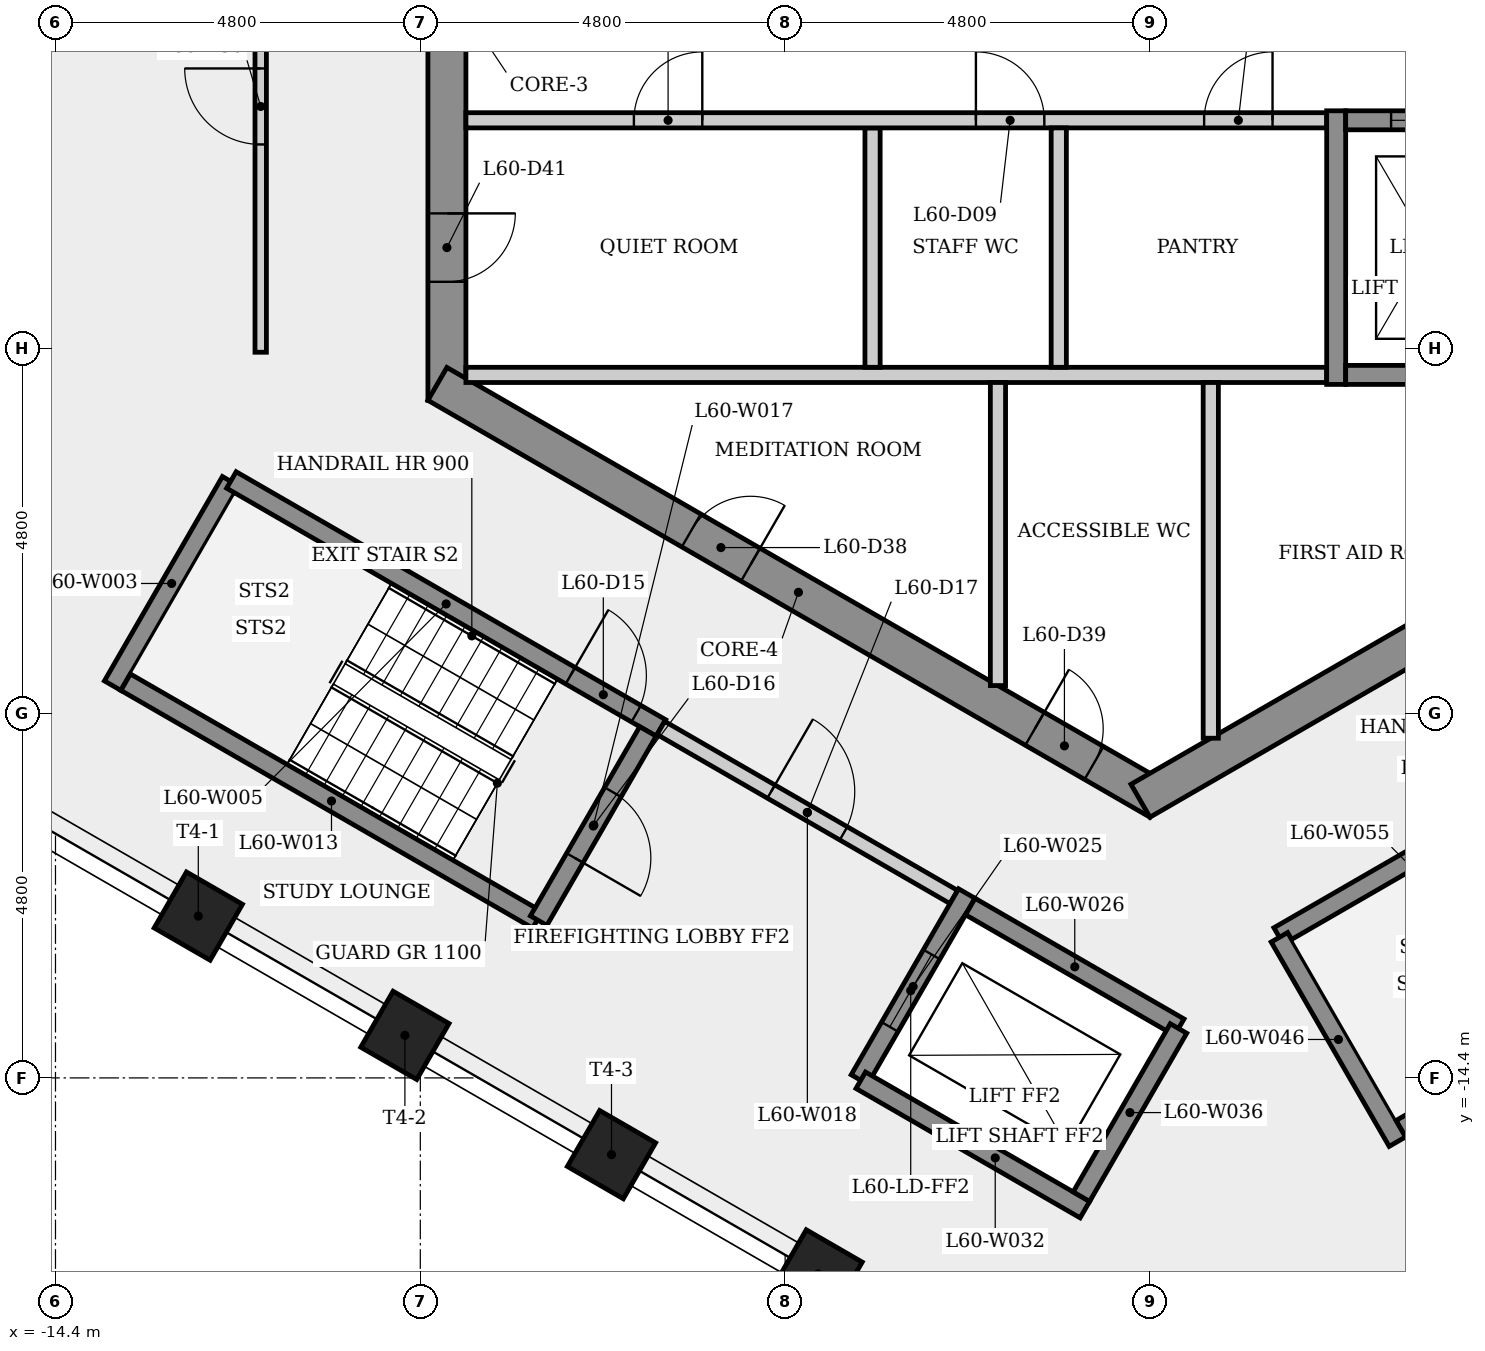
"""IFC4 building model, lengths in metres.
Left out: names, types, materials, properties, quantities, classifications, styles, units other than length and angle.
Written with IfcOpenShell. Run it as: python <this file> out.ifc"""

import sys

from ifc_helpers import new_model, si_unit, direction, frame, frame_2d, origin, origin_2d, place, context, subcontext, project, spatial, rectangle, extrude, element, fill, save


model = new_model("IFC4")
c1 = context("Model", 3, precision=1e-05, world=origin(), true_north=direction((0.0, 1.0)))
c2 = subcontext(c1, "Body", "Model", "MODEL_VIEW")
j1 = project(units=[si_unit("LENGTHUNIT", "METRE"), si_unit("PLANEANGLEUNIT", "RADIAN")], contexts=[c1])
p1 = place(None, origin())
s1 = spatial("IfcSite", under=j1, at=p1, CompositionType="ELEMENT")
p2 = place(p1, origin())
s2 = spatial("IfcBuilding", under=s1, at=p2, CompositionType="ELEMENT")
p3 = place(p2, frame((0.0, 0.0, 225.7)))
s3 = spatial("IfcBuildingStorey", under=s2, at=p3, CompositionType="ELEMENT", Elevation=225.7)
p4 = place(p3, frame((-9.25, 5.485, 0.0), z_axis=(0.0, 0.0, 1.0), x_axis=(0.0, -1.0, 0.0)))
e1 = element("IfcWall", 1, at=p4, inside=s3, PredefinedType="SHEAR", context=c2, shape_type="SweptSolid", body=[
    extrude(rectangle(XDim=10.97, YDim=0.5, at=frame_2d((5.485, 0.0))), origin(), (0.0, 0.0, 1.0), 3.4),
])
p5 = place(p4, frame((8.51, 0.0, 0.0)))
e2 = element("IfcOpeningElement", 2, at=p5, cuts=e1, PredefinedType="OPENING", context=c2, shape_type="SweptSolid", body=[
    extrude(rectangle(XDim=0.9, YDim=2.1, at=frame_2d((0.45, 1.05))), frame((0.0, 0.26, 0.0), z_axis=(0.0, -1.0, 0.0), x_axis=(1.0, 0.0, 0.0)), (0.0, 0.0, 1.0), 0.52),
])
p6 = place(p4, frame((4.685, 0.0, 0.0)))
e3 = element("IfcOpeningElement", 3, at=p6, cuts=e1, PredefinedType="OPENING", context=c2, shape_type="SweptSolid", body=[
    extrude(rectangle(XDim=1.6, YDim=2.1, at=frame_2d((0.8, 1.05))), frame((0.0, 0.26, 0.0), z_axis=(0.0, -1.0, 0.0), x_axis=(1.0, 0.0, 0.0)), (0.0, 0.0, 1.0), 0.52),
])
p7 = place(p3, frame((-9.375, -5.268, 0.0), z_axis=(0.0, 0.0, 1.0), x_axis=(0.866023993627, -0.500002442456, 0.0)))
e4 = element("IfcWall", 4, at=p7, inside=s3, PredefinedType="SHEAR", context=c2, shape_type="SweptSolid", body=[
    extrude(rectangle(XDim=10.97, YDim=0.5, at=frame_2d((5.485, 0.0))), origin(), (0.0, 0.0, 1.0), 3.4),
])
p8 = place(p7, frame((3.857, 0.0, 0.0)))
e5 = element("IfcOpeningElement", 5, at=p8, cuts=e4, PredefinedType="OPENING", context=c2, shape_type="SweptSolid", body=[
    extrude(rectangle(XDim=0.9, YDim=2.1, at=frame_2d((0.45, 1.05))), frame((0.0, 0.26, 0.0), z_axis=(0.0, -1.0, 0.0), x_axis=(1.0, 0.0, 0.0)), (0.0, 0.0, 1.0), 0.52),
])
p9 = place(p7, frame((9.076, 0.0, 0.0)))
e6 = element("IfcOpeningElement", 6, at=p9, cuts=e4, PredefinedType="OPENING", context=c2, shape_type="SweptSolid", body=[
    extrude(rectangle(XDim=0.9, YDim=2.1, at=frame_2d((0.45, 1.05))), frame((0.0, 0.26, 0.0), z_axis=(0.0, -1.0, 0.0), x_axis=(1.0, 0.0, 0.0)), (0.0, 0.0, 1.0), 0.52),
])
p10 = place(p3, frame((-0.125, -10.753, 0.0), z_axis=(0.0, 0.0, 1.0), x_axis=(0.866023993627, 0.500002442456, 0.0)))
e7 = element("IfcWall", 7, at=p10, inside=s3, PredefinedType="SHEAR", context=c2, shape_type="SweptSolid", body=[
    extrude(rectangle(XDim=10.97, YDim=0.5, at=frame_2d((5.485, 0.0))), origin(), (0.0, 0.0, 1.0), 3.4),
])
p11 = place(p10, frame((7.195, 0.0, 0.0)))
e8 = element("IfcOpeningElement", 8, at=p11, cuts=e7, PredefinedType="OPENING", context=c2, shape_type="SweptSolid", body=[
    extrude(rectangle(XDim=0.9, YDim=2.1, at=frame_2d((0.45, 1.05))), frame((0.0, 0.26, 0.0), z_axis=(0.0, -1.0, 0.0), x_axis=(1.0, 0.0, 0.0)), (0.0, 0.0, 1.0), 0.52),
])
for number, where, z_axis, x_axis in (
    (9, (-12.521, -12.271, 0.0), (0.0, 0.0, 1.0), (-0.5, -0.866, 0.0)),
    (10, (-9.803, -13.84, 0.0), (0.0, 0.0, 1.0), (-0.5, -0.866, 0.0)),
    (11, (-7.085, -15.41, 0.0), (0.0, 0.0, 1.0), (-0.5, -0.866, 0.0)),
    (12, (-4.366, -16.979, 0.0), (0.0, 0.0, 1.0), (-0.5, -0.866, 0.0)),
):
    element("IfcColumn", number, at=place(p3, frame(where, z_axis=z_axis, x_axis=x_axis)), inside=s3, PredefinedType="COLUMN", context=c2, shape_type="SweptSolid", body=[
        extrude(rectangle(XDim=0.85, YDim=0.85, at=origin_2d()), origin(), (0.0, 0.0, 1.0), 3.4),
    ])
p12 = place(p3, frame((-13.648, -9.239, 0.0), z_axis=(0.0, 0.0, 1.0), x_axis=(0.500003782172, 0.866023220135, 0.0)))
e13 = element("IfcWall", 13, at=p12, inside=s3, PredefinedType="SHEAR", context=c2, shape_type="SweptSolid", body=[
    extrude(rectangle(XDim=3.105, YDim=0.25, at=frame_2d((1.552, 0.0))), origin(), (0.0, 0.0, 1.0), 3.05),
])
p13 = place(p3, frame((-12.085, -6.532, 0.0), z_axis=(0.0, 0.0, 1.0), x_axis=(0.866031063448, -0.499990197047, 0.0)))
e14 = element("IfcWall", 14, at=p13, inside=s3, PredefinedType="SHEAR", context=c2, shape_type="SweptSolid", body=[
    extrude(rectangle(XDim=6.525, YDim=0.25, at=frame_2d((3.263, 0.0))), origin(), (0.0, 0.0, 1.0), 3.05),
])
p14 = place(p13, frame((5.15, 0.0, 0.0)))
e15 = element("IfcOpeningElement", 15, at=p14, cuts=e14, PredefinedType="OPENING", context=c2, shape_type="SweptSolid", body=[
    extrude(rectangle(XDim=1.0, YDim=2.1, at=frame_2d((0.5, 1.05))), frame((0.0, 0.135, 0.0), z_axis=(0.0, -1.0, 0.0), x_axis=(1.0, 0.0, 0.0)), (0.0, 0.0, 1.0), 0.27),
])
p15 = place(p3, frame((-11.7, -4.852, 0.0), z_axis=(0.0, 0.0, 1.0), x_axis=(0.0, 1.0, 0.0)))
e16 = element("IfcWall", 16, at=p15, inside=s3, PredefinedType="PARTITIONING", context=c2, shape_type="SweptSolid", body=[
    extrude(rectangle(XDim=9.779, YDim=0.15, at=frame_2d((4.889, 0.0))), origin(), (0.0, 0.0, 1.0), 3.05),
])
p16 = place(p15, frame((7.586, 0.0, 0.0)))
e17 = element("IfcOpeningElement", 17, at=p16, cuts=e16, PredefinedType="OPENING", context=c2, shape_type="SweptSolid", body=[
    extrude(rectangle(XDim=1.0, YDim=2.1, at=frame_2d((0.5, 1.05))), frame((0.0, 0.085, 0.0), z_axis=(0.0, -1.0, 0.0), x_axis=(1.0, 0.0, 0.0)), (0.0, 0.0, 1.0), 0.17),
])
p17 = place(p15, frame((2.734, 0.0, 0.0)))
e18 = element("IfcOpeningElement", 18, at=p17, cuts=e16, PredefinedType="OPENING", context=c2, shape_type="SweptSolid", body=[
    extrude(rectangle(XDim=1.0, YDim=2.1, at=frame_2d((0.5, 1.05))), frame((0.0, 0.085, 0.0), z_axis=(0.0, -1.0, 0.0), x_axis=(1.0, 0.0, 0.0)), (0.0, 0.0, 1.0), 0.17),
])
p18 = place(p3, frame((-9.0, -5.15, 0.0), z_axis=(0.0, 0.0, 1.0), x_axis=(1.0, 0.0, 0.0)))
e19 = element("IfcWall", 19, at=p18, inside=s3, PredefinedType="PARTITIONING", context=c2, shape_type="SweptSolid", body=[
    extrude(rectangle(XDim=11.325, YDim=0.2, at=frame_2d((5.663, 0.0))), origin(), (0.0, 0.0, 1.0), 3.05),
])
p19 = place(p3, frame((-8.06, -12.321, 0.0), z_axis=(0.0, 0.0, 1.0), x_axis=(-0.866029591389, 0.499992746786, 0.0)))
e20 = element("IfcWall", 20, at=p19, inside=s3, PredefinedType="SHEAR", context=c2, shape_type="SweptSolid", body=[
    extrude(rectangle(XDim=6.255, YDim=0.25, at=frame_2d((3.127, 0.0))), origin(), (0.0, 0.0, 1.0), 3.05),
])
p20 = place(p3, frame((-6.605, -9.841, 0.0), z_axis=(0.0, 0.0, 1.0), x_axis=(-0.500011588718, -0.866018712932, 0.0)))
e21 = element("IfcWall", 21, at=p20, inside=s3, PredefinedType="SHEAR", context=c2, shape_type="SweptSolid", body=[
    extrude(rectangle(XDim=2.875, YDim=0.25, at=frame_2d((1.438, 0.0))), origin(), (0.0, 0.0, 1.0), 3.05),
])
p21 = place(p20, frame((0.923, 0.0, 0.0)))
e22 = element("IfcOpeningElement", 22, at=p21, cuts=e21, PredefinedType="OPENING", context=c2, shape_type="SweptSolid", body=[
    extrude(rectangle(XDim=1.0, YDim=2.1, at=frame_2d((0.5, 1.05))), frame((0.0, 0.135, 0.0), z_axis=(0.0, -1.0, 0.0), x_axis=(1.0, 0.0, 0.0)), (0.0, 0.0, 1.0), 0.27),
])
p22 = place(p3, frame((-6.435, -9.795, 0.0), z_axis=(0.0, 0.0, 1.0), x_axis=(0.866012907634, -0.500021643343, 0.0)))
e23 = element("IfcWall", 23, at=p22, inside=s3, PredefinedType="PARTITIONING", context=c2, shape_type="SweptSolid", body=[
    extrude(rectangle(XDim=4.45, YDim=0.2, at=frame_2d((2.225, 0.0))), origin(), (0.0, 0.0, 1.0), 3.05),
])
p23 = place(p22, frame((1.675, 0.0, 0.0)))
e24 = element("IfcOpeningElement", 24, at=p23, cuts=e23, PredefinedType="OPENING", context=c2, shape_type="SweptSolid", body=[
    extrude(rectangle(XDim=1.1, YDim=2.1, at=frame_2d((0.55, 1.05))), frame((0.0, 0.11, 0.0), z_axis=(0.0, -1.0, 0.0), x_axis=(1.0, 0.0, 0.0)), (0.0, 0.0, 1.0), 0.22),
])
p24 = place(p3, frame((-3.65, -1.9, 0.0), z_axis=(0.0, 0.0, 1.0), x_axis=(0.0, -1.0, 0.0)))
e25 = element("IfcWall", 25, at=p24, inside=s3, PredefinedType="PARTITIONING", context=c2, shape_type="SweptSolid", body=[
    extrude(rectangle(XDim=3.15, YDim=0.2, at=frame_2d((1.575, 0.0))), origin(), (0.0, 0.0, 1.0), 3.05),
])
p25 = place(p3, frame((-9.0, -1.8, 0.0), z_axis=(0.0, 0.0, 1.0), x_axis=(1.0, 0.0, 0.0)))
e26 = element("IfcWall", 26, at=p25, inside=s3, PredefinedType="PARTITIONING", context=c2, shape_type="SweptSolid", body=[
    extrude(rectangle(XDim=11.325, YDim=0.2, at=frame_2d((5.663, 0.0))), origin(), (0.0, 0.0, 1.0), 3.05),
])
p26 = place(p25, frame((2.21, 0.0, 0.0)))
e27 = element("IfcOpeningElement", 27, at=p26, cuts=e26, PredefinedType="OPENING", context=c2, shape_type="SweptSolid", body=[
    extrude(rectangle(XDim=0.9, YDim=2.1, at=frame_2d((0.45, 1.05))), frame((0.0, 0.11, 0.0), z_axis=(0.0, -1.0, 0.0), x_axis=(1.0, 0.0, 0.0)), (0.0, 0.0, 1.0), 0.22),
])
p27 = place(p25, frame((6.71, 0.0, 0.0)))
e28 = element("IfcOpeningElement", 28, at=p27, cuts=e26, PredefinedType="OPENING", context=c2, shape_type="SweptSolid", body=[
    extrude(rectangle(XDim=0.9, YDim=2.1, at=frame_2d((0.45, 1.05))), frame((0.0, 0.11, 0.0), z_axis=(0.0, -1.0, 0.0), x_axis=(1.0, 0.0, 0.0)), (0.0, 0.0, 1.0), 0.22),
])
p28 = place(p25, frame((9.713, 0.0, 0.0)))
e29 = element("IfcOpeningElement", 29, at=p28, cuts=e26, PredefinedType="OPENING", context=c2, shape_type="SweptSolid", body=[
    extrude(rectangle(XDim=0.9, YDim=2.1, at=frame_2d((0.45, 1.05))), frame((0.0, 0.11, 0.0), z_axis=(0.0, -1.0, 0.0), x_axis=(1.0, 0.0, 0.0)), (0.0, 0.0, 1.0), 0.22),
])
p29 = place(p3, frame((-2.41, -11.974, 0.0), z_axis=(0.0, 0.0, 1.0), x_axis=(-0.49998675294, -0.866033051843, 0.0)))
e30 = element("IfcWall", 30, at=p29, inside=s3, PredefinedType="SHEAR", context=c2, shape_type="SweptSolid", body=[
    extrude(rectangle(XDim=2.825, YDim=0.25, at=frame_2d((1.413, 0.0))), origin(), (0.0, 0.0, 1.0), 3.05),
])
p30 = place(p29, frame((0.926, 0.0, 0.0)))
e31 = element("IfcOpeningElement", 31, at=p30, cuts=e30, PredefinedType="OPENING", context=c2, shape_type="SweptSolid", body=[
    extrude(rectangle(XDim=1.1, YDim=2.1, at=frame_2d((0.55, 1.05))), frame((0.0, 0.135, 0.0), z_axis=(0.0, -1.0, 0.0), x_axis=(1.0, 0.0, 0.0)), (0.0, 0.0, 1.0), 0.27),
])
p31 = place(p3, frame((-2.364, -12.145, 0.0), z_axis=(0.0, 0.0, 1.0), x_axis=(0.866048579423, -0.499959856469, 0.0)))
e32 = element("IfcWall", 32, at=p31, inside=s3, PredefinedType="SHEAR", context=c2, shape_type="SweptSolid", body=[
    extrude(rectangle(XDim=3.175, YDim=0.25, at=frame_2d((1.587, 0.0))), origin(), (0.0, 0.0, 1.0), 3.4),
])
p32 = place(p3, frame((-2.0, -5.25, 0.0), z_axis=(0.0, 0.0, 1.0), x_axis=(0.0, -1.0, 0.0)))
e33 = element("IfcWall", 33, at=p32, inside=s3, PredefinedType="PARTITIONING", context=c2, shape_type="SweptSolid", body=[
    extrude(rectangle(XDim=3.988, YDim=0.2, at=frame_2d((1.994, 0.0))), origin(), (0.0, 0.0, 1.0), 3.05),
])
p33 = place(p3, frame((-1.2, -1.9, 0.0), z_axis=(0.0, 0.0, 1.0), x_axis=(0.0, -1.0, 0.0)))
e34 = element("IfcWall", 34, at=p33, inside=s3, PredefinedType="PARTITIONING", context=c2, shape_type="SweptSolid", body=[
    extrude(rectangle(XDim=3.15, YDim=0.2, at=frame_2d((1.575, 0.0))), origin(), (0.0, 0.0, 1.0), 3.05),
])
p34 = place(p3, frame((-0.856, -16.133, 0.0), z_axis=(0.0, 0.0, 1.0), x_axis=(-0.866032748241, 0.499987278812, 0.0)))
e35 = element("IfcWall", 35, at=p34, inside=s3, PredefinedType="SHEAR", context=c2, shape_type="SweptSolid", body=[
    extrude(rectangle(XDim=3.405, YDim=0.25, at=frame_2d((1.702, 0.0))), origin(), (0.0, 0.0, 1.0), 3.05),
])
p35 = place(p3, frame((0.375, -13.75, 0.0), z_axis=(0.0, 0.0, 1.0), x_axis=(-0.50003400563, -0.866005769735, 0.0)))
e36 = element("IfcWall", 36, at=p35, inside=s3, PredefinedType="SHEAR", context=c2, shape_type="SweptSolid", body=[
    extrude(rectangle(XDim=2.555, YDim=0.25, at=frame_2d((1.277, 0.0))), origin(), (0.0, 0.0, 1.0), 3.4),
])
p36 = place(p3, frame((0.8, -5.25, 0.0), z_axis=(0.0, 0.0, 1.0), x_axis=(0.0, -1.0, 0.0)))
e37 = element("IfcWall", 37, at=p36, inside=s3, PredefinedType="PARTITIONING", context=c2, shape_type="SweptSolid", body=[
    extrude(rectangle(XDim=4.68, YDim=0.2, at=frame_2d((2.34, 0.0))), origin(), (0.0, 0.0, 1.0), 3.05),
])
p37 = place(p3, frame((1.693, -12.532, 0.0), z_axis=(0.0, 0.0, 1.0), x_axis=(0.866031063448, 0.499990197047, 0.0)))
e38 = element("IfcWall", 38, at=p37, inside=s3, PredefinedType="SHEAR", context=c2, shape_type="SweptSolid", body=[
    extrude(rectangle(XDim=6.525, YDim=0.25, at=frame_2d((3.263, 0.0))), origin(), (0.0, 0.0, 1.0), 3.05),
])
p38 = place(p37, frame((5.15, 0.0, 0.0)))
e39 = element("IfcOpeningElement", 39, at=p38, cuts=e38, PredefinedType="OPENING", context=c2, shape_type="SweptSolid", body=[
    extrude(rectangle(XDim=1.0, YDim=2.1, at=frame_2d((0.5, 1.05))), frame((0.0, 0.135, 0.0), z_axis=(0.0, -1.0, 0.0), x_axis=(1.0, 0.0, 0.0)), (0.0, 0.0, 1.0), 0.27),
])
p39 = place(p3, frame((2.45, -5.275, 0.0), z_axis=(0.0, 0.0, 1.0), x_axis=(0.0, 1.0, 0.0)))
e40 = element("IfcWall", 40, at=p39, inside=s3, PredefinedType="SHEAR", context=c2, shape_type="SweptSolid", body=[
    extrude(rectangle(XDim=3.6, YDim=0.25, at=frame_2d((1.8, 0.0))), origin(), (0.0, 0.0, 1.0), 3.05),
])
p40 = place(p3, frame((3.256, -15.239, 0.0), z_axis=(0.0, 0.0, 1.0), x_axis=(-0.500003782172, 0.866023220135, 0.0)))
e41 = element("IfcWall", 41, at=p40, inside=s3, PredefinedType="SHEAR", context=c2, shape_type="SweptSolid", body=[
    extrude(rectangle(XDim=3.105, YDim=0.25, at=frame_2d((1.552, 0.0))), origin(), (0.0, 0.0, 1.0), 3.05),
])
p41 = place(p3, frame((2.575, -5.15, 0.0), z_axis=(0.0, 0.0, 1.0), x_axis=(1.0, 0.0, 0.0)))
e42 = element("IfcWall", 42, at=p41, inside=s3, PredefinedType="SHEAR", context=c2, shape_type="SweptSolid", body=[
    extrude(rectangle(XDim=4.9, YDim=0.25, at=frame_2d((2.45, 0.0))), origin(), (0.0, 0.0, 1.0), 3.05),
])
p42 = place(p3, frame((2.575, -1.8, 0.0), z_axis=(0.0, 0.0, 1.0), x_axis=(1.0, 0.0, 0.0)))
e43 = element("IfcWall", 43, at=p42, inside=s3, PredefinedType="SHEAR", context=c2, shape_type="SweptSolid", body=[
    extrude(rectangle(XDim=4.9, YDim=0.25, at=frame_2d((2.45, 0.0))), origin(), (0.0, 0.0, 1.0), 3.05),
])
p43 = place(p42, frame((0.597, 0.0, 0.0)))
e44 = element("IfcOpeningElement", 44, at=p43, cuts=e43, PredefinedType="OPENING", context=c2, shape_type="SweptSolid", body=[
    extrude(rectangle(XDim=1.1, YDim=2.1, at=frame_2d((0.55, 1.05))), frame((0.0, 0.135, 0.0), z_axis=(0.0, -1.0, 0.0), x_axis=(1.0, 0.0, 0.0)), (0.0, 0.0, 1.0), 0.27),
])
p44 = place(p3, frame((7.073, -12.891, 0.0), z_axis=(0.0, 0.0, 1.0), x_axis=(-0.866023145199, -0.500003911965, 0.0)))
e45 = element("IfcWall", 45, at=p44, inside=s3, PredefinedType="SHEAR", context=c2, shape_type="SweptSolid", body=[
    extrude(rectangle(XDim=4.355, YDim=0.25, at=frame_2d((2.177, 0.0))), origin(), (0.0, 0.0, 1.0), 3.05),
])
p45 = place(p43, origin())
e46 = element("IfcDoor", 46, at=p45, inside=s3, OperationType="SLIDING_TO_LEFT", PredefinedType="DOOR", context=c2, shape_type="SweptSolid", body=[
    extrude(rectangle(XDim=1.1, YDim=2.1, at=frame_2d((0.55, 1.05))), frame((0.0, 0.025, 0.0), z_axis=(0.0, -1.0, 0.0), x_axis=(1.0, 0.0, 0.0)), (0.0, 0.0, 1.0), 0.05),
])
fill(e44, e46)
p46 = place(p26, origin())
e47 = element("IfcDoor", 47, at=p46, inside=s3, OperationType="SINGLE_SWING_RIGHT", PredefinedType="DOOR", context=c2, shape_type="SweptSolid", body=[
    extrude(rectangle(XDim=0.9, YDim=2.1, at=frame_2d((0.45, 1.05))), frame((0.0, 0.025, 0.0), z_axis=(0.0, -1.0, 0.0), x_axis=(1.0, 0.0, 0.0)), (0.0, 0.0, 1.0), 0.05),
])
fill(e27, e47)
p47 = place(p27, origin())
e48 = element("IfcDoor", 48, at=p47, inside=s3, OperationType="SINGLE_SWING_LEFT", PredefinedType="DOOR", context=c2, shape_type="SweptSolid", body=[
    extrude(rectangle(XDim=0.9, YDim=2.1, at=frame_2d((0.45, 1.05))), frame((0.0, 0.025, 0.0), z_axis=(0.0, -1.0, 0.0), x_axis=(1.0, 0.0, 0.0)), (0.0, 0.0, 1.0), 0.05),
])
fill(e28, e48)
p48 = place(p28, origin())
e49 = element("IfcDoor", 49, at=p48, inside=s3, OperationType="SINGLE_SWING_RIGHT", PredefinedType="DOOR", context=c2, shape_type="SweptSolid", body=[
    extrude(rectangle(XDim=0.9, YDim=2.1, at=frame_2d((0.45, 1.05))), frame((0.0, 0.025, 0.0), z_axis=(0.0, -1.0, 0.0), x_axis=(1.0, 0.0, 0.0)), (0.0, 0.0, 1.0), 0.05),
])
fill(e29, e49)
p49 = place(p14, origin())
e50 = element("IfcDoor", 50, at=p49, inside=s3, OperationType="SINGLE_SWING_LEFT", PredefinedType="DOOR", context=c2, shape_type="SweptSolid", body=[
    extrude(rectangle(XDim=1.0, YDim=2.1, at=frame_2d((0.5, 1.05))), frame((0.0, 0.025, 0.0), z_axis=(0.0, -1.0, 0.0), x_axis=(1.0, 0.0, 0.0)), (0.0, 0.0, 1.0), 0.05),
])
fill(e15, e50)
p50 = place(p21, origin())
e51 = element("IfcDoor", 51, at=p50, inside=s3, OperationType="SINGLE_SWING_RIGHT", PredefinedType="DOOR", context=c2, shape_type="SweptSolid", body=[
    extrude(rectangle(XDim=1.0, YDim=2.1, at=frame_2d((0.5, 1.05))), frame((0.0, 0.025, 0.0), z_axis=(0.0, -1.0, 0.0), x_axis=(1.0, 0.0, 0.0)), (0.0, 0.0, 1.0), 0.05),
])
fill(e22, e51)
p51 = place(p23, origin())
e52 = element("IfcDoor", 52, at=p51, inside=s3, OperationType="SINGLE_SWING_LEFT", PredefinedType="DOOR", context=c2, shape_type="SweptSolid", body=[
    extrude(rectangle(XDim=1.1, YDim=2.1, at=frame_2d((0.55, 1.05))), frame((0.0, 0.025, 0.0), z_axis=(0.0, -1.0, 0.0), x_axis=(1.0, 0.0, 0.0)), (0.0, 0.0, 1.0), 0.05),
])
fill(e24, e52)
p52 = place(p30, origin())
e53 = element("IfcDoor", 53, at=p52, inside=s3, OperationType="SLIDING_TO_LEFT", PredefinedType="DOOR", context=c2, shape_type="SweptSolid", body=[
    extrude(rectangle(XDim=1.1, YDim=2.1, at=frame_2d((0.55, 1.05))), frame((0.0, 0.025, 0.0), z_axis=(0.0, -1.0, 0.0), x_axis=(1.0, 0.0, 0.0)), (0.0, 0.0, 1.0), 0.05),
])
fill(e31, e53)
p53 = place(p17, origin())
e54 = element("IfcDoor", 54, at=p53, inside=s3, OperationType="SINGLE_SWING_RIGHT", PredefinedType="DOOR", context=c2, shape_type="SweptSolid", body=[
    extrude(rectangle(XDim=1.0, YDim=2.1, at=frame_2d((0.5, 1.05))), frame((0.0, 0.025, 0.0), z_axis=(0.0, -1.0, 0.0), x_axis=(1.0, 0.0, 0.0)), (0.0, 0.0, 1.0), 0.05),
])
fill(e18, e54)
p54 = place(p8, origin())
e55 = element("IfcDoor", 55, at=p54, inside=s3, OperationType="SINGLE_SWING_RIGHT", PredefinedType="DOOR", context=c2, shape_type="SweptSolid", body=[
    extrude(rectangle(XDim=0.9, YDim=2.1, at=frame_2d((0.45, 1.05))), frame((0.0, 0.025, 0.0), z_axis=(0.0, -1.0, 0.0), x_axis=(1.0, 0.0, 0.0)), (0.0, 0.0, 1.0), 0.05),
])
fill(e5, e55)
p55 = place(p9, origin())
e56 = element("IfcDoor", 56, at=p55, inside=s3, OperationType="SINGLE_SWING_LEFT", PredefinedType="DOOR", context=c2, shape_type="SweptSolid", body=[
    extrude(rectangle(XDim=0.9, YDim=2.1, at=frame_2d((0.45, 1.05))), frame((0.0, 0.025, 0.0), z_axis=(0.0, -1.0, 0.0), x_axis=(1.0, 0.0, 0.0)), (0.0, 0.0, 1.0), 0.05),
])
fill(e6, e56)
p56 = place(p5, origin())
e57 = element("IfcDoor", 57, at=p56, inside=s3, OperationType="SINGLE_SWING_LEFT", PredefinedType="DOOR", context=c2, shape_type="SweptSolid", body=[
    extrude(rectangle(XDim=0.9, YDim=2.1, at=frame_2d((0.45, 1.05))), frame((0.0, 0.025, 0.0), z_axis=(0.0, -1.0, 0.0), x_axis=(1.0, 0.0, 0.0)), (0.0, 0.0, 1.0), 0.05),
])
fill(e2, e57)
save(model, sys.argv[1])
